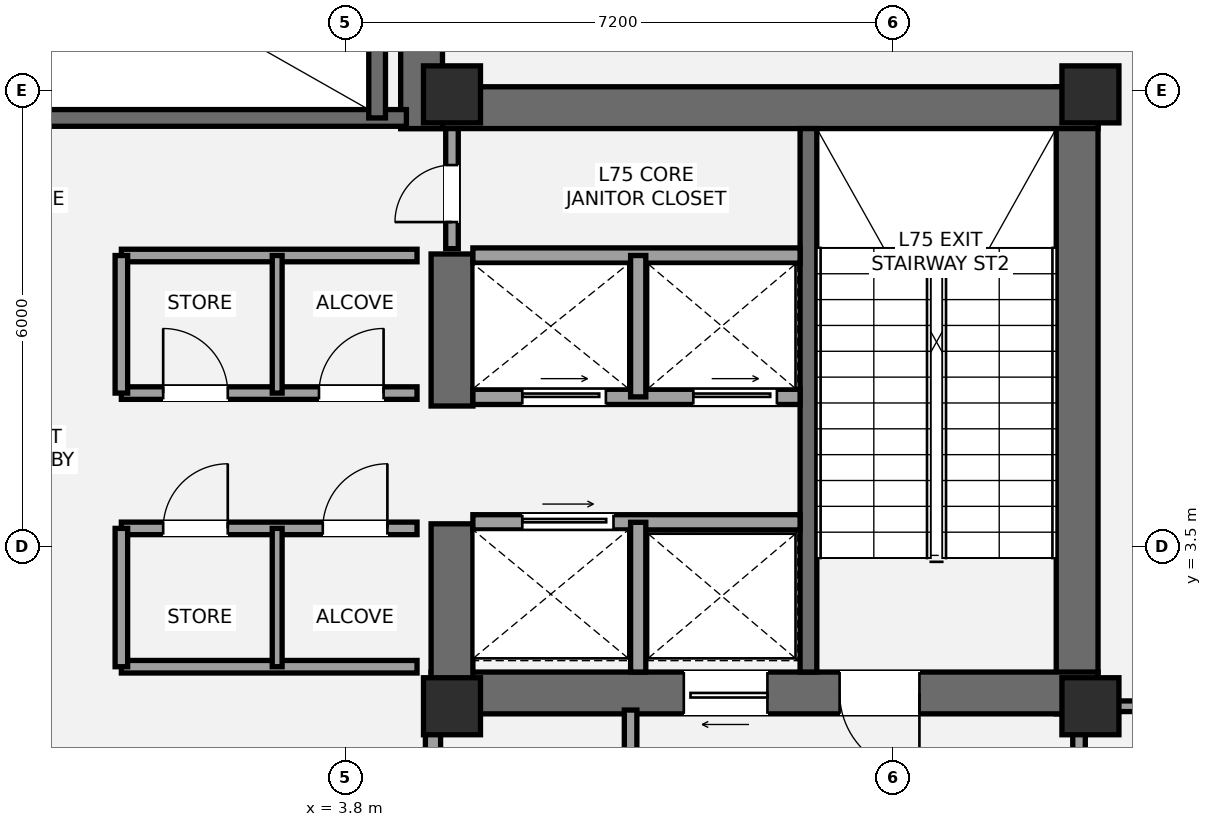
"""IFC4 building model, lengths in metres.
Left out: names, types, materials, properties, quantities, classifications, styles, units other than length and angle.
Written with IfcOpenShell. Run it as: python <this file> out.ifc"""

import sys

from ifc_helpers import new_model, si_unit, direction, frame, frame_2d, origin, origin_2d, place, context, subcontext, project, spatial, rectangle, extrude, element, fill, save


model = new_model("IFC4")
c1 = context("Model", 3, precision=1e-05, world=origin(), true_north=direction((0.0, 1.0)))
c2 = subcontext(c1, "Body", "Model", "MODEL_VIEW")
j1 = project(units=[si_unit("LENGTHUNIT", "METRE"), si_unit("PLANEANGLEUNIT", "RADIAN")], contexts=[c1])
p1 = place(None, origin())
s1 = spatial("IfcSite", under=j1, at=p1, CompositionType="ELEMENT")
p2 = place(p1, origin())
s2 = spatial("IfcBuilding", under=s1, at=p2, CompositionType="ELEMENT")
p3 = place(p2, frame((0.0, 0.0, 264.8)))
s3 = spatial("IfcBuildingStorey", under=s2, at=p3, CompositionType="ELEMENT", Elevation=264.8)
p4 = place(p3, frame((13.425, 1.3, 0.0), z_axis=(0.0, 0.0, 1.0), x_axis=(0.0, 1.0, 0.0)))
e1 = element("IfcWall", 1, at=p4, inside=s3, PredefinedType="SHEAR", context=c2, shape_type="SweptSolid", body=[
    extrude(rectangle(XDim=8.25, YDim=0.55, at=frame_2d((4.125, 0.0))), origin(), (0.0, 0.0, 1.0), 4.4),
])
p5 = place(p3, frame((4.525, 9.275, 0.0), z_axis=(0.0, 0.0, 1.0), x_axis=(1.0, 0.0, 0.0)))
e2 = element("IfcWall", 2, at=p5, inside=s3, PredefinedType="SHEAR", context=c2, shape_type="SweptSolid", body=[
    extrude(rectangle(XDim=9.175, YDim=0.55, at=frame_2d((4.587, 0.0))), origin(), (0.0, 0.0, 1.0), 4.4),
])
p6 = place(p3, frame((13.7, 1.575, 0.0), z_axis=(0.0, 0.0, 1.0), x_axis=(-1.0, 0.0, 0.0)))
e3 = element("IfcWall", 3, at=p6, inside=s3, PredefinedType="SHEAR", context=c2, shape_type="SweptSolid", body=[
    extrude(rectangle(XDim=8.775, YDim=0.55, at=frame_2d((4.387, 0.0))), origin(), (0.0, 0.0, 1.0), 4.4),
])
p7 = place(p6, frame((2.35, 0.0, 0.0)))
e4 = element("IfcOpeningElement", 4, at=p7, cuts=e3, PredefinedType="OPENING", context=c2, shape_type="SweptSolid", body=[
    extrude(rectangle(XDim=1.05, YDim=2.15, at=frame_2d((0.525, 1.075))), frame((0.0, 0.285, 0.0), z_axis=(0.0, -1.0, 0.0), x_axis=(1.0, 0.0, 0.0)), (0.0, 0.0, 1.0), 0.57),
])
p8 = place(p6, frame((4.35, 0.0, 0.0)))
e5 = element("IfcOpeningElement", 5, at=p8, cuts=e3, PredefinedType="OPENING", context=c2, shape_type="SweptSolid", body=[
    extrude(rectangle(XDim=1.1, YDim=2.2, at=frame_2d((0.55, 1.1))), frame((0.0, 0.285, 0.0), z_axis=(0.0, -1.0, 0.0), x_axis=(1.0, 0.0, 0.0)), (0.0, 0.0, 1.0), 0.57),
])
p9 = place(p3, frame((5.2, 1.3, 0.0), z_axis=(0.0, 0.0, 1.0), x_axis=(0.0, 1.0, 0.0)))
e6 = element("IfcWall", 6, at=p9, inside=s3, PredefinedType="SHEAR", context=c2, shape_type="SweptSolid", body=[
    extrude(rectangle(XDim=2.5, YDim=0.55, at=frame_2d((1.25, 0.0))), origin(), (0.0, 0.0, 1.0), 4.4),
])
p10 = place(p3, frame((5.2, 5.35, 0.0), z_axis=(0.0, 0.0, 1.0), x_axis=(0.0, 1.0, 0.0)))
e7 = element("IfcWall", 7, at=p10, inside=s3, PredefinedType="SHEAR", context=c2, shape_type="SweptSolid", body=[
    extrude(rectangle(XDim=2.0, YDim=0.55, at=frame_2d((1.0, 0.0))), origin(), (0.0, 0.0, 1.0), 4.4),
])
p11 = place(p3, frame((9.89, 1.85, 0.0), z_axis=(0.0, 0.0, 1.0), x_axis=(0.0, 1.0, 0.0)))
e8 = element("IfcWall", 8, at=p11, inside=s3, PredefinedType="SHEAR", context=c2, shape_type="SweptSolid", body=[
    extrude(rectangle(XDim=7.15, YDim=0.22, at=frame_2d((3.575, 0.0))), origin(), (0.0, 0.0, 1.0), 4.4),
])
p12 = place(p3, frame((4.8, 9.0, 0.0), z_axis=(0.0, 0.0, 1.0), x_axis=(0.0, 1.0, 0.0)))
e9 = element("IfcWall", 9, at=p12, inside=s3, PredefinedType="SHEAR", context=c2, shape_type="SweptSolid", body=[
    extrude(rectangle(XDim=3.95, YDim=0.55, at=frame_2d((1.975, 0.0))), origin(), (0.0, 0.0, 1.0), 4.4),
])
p13 = place(p3, frame((-4.7, 9.14, 0.0), z_axis=(0.0, 0.0, 1.0), x_axis=(1.0, 0.0, 0.0)))
e10 = element("IfcWall", 10, at=p13, inside=s3, PredefinedType="SHEAR", context=c2, shape_type="SweptSolid", body=[
    extrude(rectangle(XDim=9.3, YDim=0.22, at=frame_2d((4.65, 0.0))), origin(), (0.0, 0.0, 1.0), 4.4),
])
p14 = place(p13, frame((1.15, 0.0, 0.0)))
e11 = element("IfcOpeningElement", 11, at=p14, cuts=e10, PredefinedType="OPENING", context=c2, shape_type="SweptSolid", body=[
    extrude(rectangle(XDim=1.05, YDim=2.15, at=frame_2d((0.525, 1.075))), frame((0.0, 0.12, 0.0), z_axis=(0.0, -1.0, 0.0), x_axis=(1.0, 0.0, 0.0)), (0.0, 0.0, 1.0), 0.24),
])
p15 = place(p3, frame((4.215, 9.14, 0.0), z_axis=(0.0, 0.0, 1.0), x_axis=(0.0, 1.0, 0.0)))
e12 = element("IfcWall", 12, at=p15, inside=s3, PredefinedType="SHEAR", context=c2, shape_type="SweptSolid", body=[
    extrude(rectangle(XDim=3.26, YDim=0.22, at=frame_2d((1.63, 0.0))), origin(), (0.0, 0.0, 1.0), 4.4),
])
for number, where, z_axis, x_axis in (
    (13, (5.2, 1.4, 0.0), (0.0, 0.0, 1.0), (1.0, 0.0, 0.0)),
    (14, (5.2, 9.45, 0.0), (0.0, 0.0, 1.0), (1.0, 0.0, 0.0)),
    (15, (13.6, 1.4, 0.0), (0.0, 0.0, 1.0), (1.0, 0.0, 0.0)),
    (16, (13.6, 9.45, 0.0), (0.0, 0.0, 1.0), (1.0, 0.0, 0.0)),
):
    element("IfcColumn", number, at=place(p3, frame(where, z_axis=z_axis, x_axis=x_axis)), inside=s3, PredefinedType="PILASTER", context=c2, shape_type="SweptSolid", body=[
        extrude(rectangle(XDim=0.75, YDim=0.75, at=origin_2d()), origin(), (0.0, 0.0, 1.0), 4.4),
    ])
p16 = place(p3, frame((14.188, 11.64, 0.0), z_axis=(0.0, 0.0, 1.0), x_axis=(0.827740547026, -0.56111102895, 0.0)))
e17 = element("IfcWall", 17, at=p16, inside=s3, PredefinedType="STANDARD", context=c2, shape_type="SweptSolid", body=[
    extrude(rectangle(XDim=3.778, YDim=0.44, at=frame_2d((1.889, 0.0))), origin(), (0.0, 0.0, 1.0), 3.566),
])
p17 = place(p16, frame((0.446, 0.0, 0.6)))
e18 = element("IfcOpeningElement", 18, at=p17, cuts=e17, PredefinedType="OPENING", context=c2, shape_type="SweptSolid", body=[
    extrude(rectangle(XDim=2.0, YDim=2.1, at=frame_2d((1.0, 1.05))), frame((0.0, 0.23, 0.0), z_axis=(0.0, -1.0, 0.0), x_axis=(1.0, 0.0, 0.0)), (0.0, 0.0, 1.0), 0.46),
])
p18 = place(p3, frame((7.55, -1.88, 0.0), z_axis=(0.0, 0.0, 1.0), x_axis=(0.0, 1.0, 0.0)))
e19 = element("IfcWall", 19, at=p18, inside=s3, PredefinedType="PARTITIONING", context=c2, shape_type="SweptSolid", body=[
    extrude(rectangle(XDim=3.23, YDim=0.165, at=frame_2d((1.615, 0.0))), origin(), (0.0, 0.0, 1.0), 4.2),
])
p19 = place(p3, frame((13.45, -1.88, 0.0), z_axis=(0.0, 0.0, 1.0), x_axis=(0.0, 1.0, 0.0)))
e20 = element("IfcWall", 20, at=p19, inside=s3, PredefinedType="PARTITIONING", context=c2, shape_type="SweptSolid", body=[
    extrude(rectangle(XDim=3.23, YDim=0.165, at=frame_2d((1.615, 0.0))), origin(), (0.0, 0.0, 1.0), 3.661),
])
p20 = place(p19, frame((0.95, 0.0, 0.0)))
e21 = element("IfcOpeningElement", 21, at=p20, cuts=e20, PredefinedType="OPENING", context=c2, shape_type="SweptSolid", body=[
    extrude(rectangle(XDim=1.05, YDim=2.15, at=frame_2d((0.525, 1.075))), frame((0.0, 0.093, 0.0), z_axis=(0.0, -1.0, 0.0), x_axis=(1.0, 0.0, 0.0)), (0.0, 0.0, 1.0), 0.185),
])
p21 = place(p3, frame((4.95, -1.88, 0.0), z_axis=(0.0, 0.0, 1.0), x_axis=(0.0, 1.0, 0.0)))
e22 = element("IfcWall", 22, at=p21, inside=s3, PredefinedType="SOLIDWALL", context=c2, shape_type="SweptSolid", body=[
    extrude(rectangle(XDim=3.23, YDim=0.2, at=frame_2d((1.615, 0.0))), origin(), (0.0, 0.0, 1.0), 3.568),
])
p22 = place(p21, frame((0.61, 0.0, 0.0)))
e23 = element("IfcOpeningElement", 23, at=p22, cuts=e22, PredefinedType="OPENING", context=c2, shape_type="SweptSolid", body=[
    extrude(rectangle(XDim=0.75, YDim=2.1, at=frame_2d((0.375, 1.05))), frame((0.0, 0.11, 0.0), z_axis=(0.0, -1.0, 0.0), x_axis=(1.0, 0.0, 0.0)), (0.0, 0.0, 1.0), 0.22),
])
p23 = place(p3, frame((5.475, 3.82, 0.0), z_axis=(0.0, 0.0, 1.0), x_axis=(1.0, 0.0, 0.0)))
e24 = element("IfcWall", 24, at=p23, inside=s3, PredefinedType="SOLIDWALL", context=c2, shape_type="SweptSolid", body=[
    extrude(rectangle(XDim=4.305, YDim=0.2, at=frame_2d((2.152, 0.0))), origin(), (0.0, 0.0, 1.0), 4.2),
])
p24 = place(p23, frame((0.65, 0.0, 0.0)))
e25 = element("IfcOpeningElement", 25, at=p24, cuts=e24, PredefinedType="OPENING", context=c2, shape_type="SweptSolid", body=[
    extrude(rectangle(XDim=1.2, YDim=2.2, at=frame_2d((0.6, 1.1))), frame((0.0, 0.11, 0.0), z_axis=(0.0, -1.0, 0.0), x_axis=(1.0, 0.0, 0.0)), (0.0, 0.0, 1.0), 0.22),
])
p25 = place(p3, frame((7.65, 1.85, 0.0), z_axis=(0.0, 0.0, 1.0), x_axis=(0.0, 1.0, 0.0)))
e26 = element("IfcWall", 26, at=p25, inside=s3, PredefinedType="SOLIDWALL", context=c2, shape_type="SweptSolid", body=[
    extrude(rectangle(XDim=1.97, YDim=0.2, at=frame_2d((0.985, 0.0))), origin(), (0.0, 0.0, 1.0), 4.2),
])
p26 = place(p3, frame((5.475, 5.47, 0.0), z_axis=(0.0, 0.0, 1.0), x_axis=(1.0, 0.0, 0.0)))
e27 = element("IfcWall", 27, at=p26, inside=s3, PredefinedType="SOLIDWALL", context=c2, shape_type="SweptSolid", body=[
    extrude(rectangle(XDim=4.305, YDim=0.2, at=frame_2d((2.152, 0.0))), origin(), (0.0, 0.0, 1.0), 4.2),
])
p27 = place(p26, frame((0.65, 0.0, 0.0)))
e28 = element("IfcOpeningElement", 28, at=p27, cuts=e27, PredefinedType="OPENING", context=c2, shape_type="SweptSolid", body=[
    extrude(rectangle(XDim=1.1, YDim=2.2, at=frame_2d((0.55, 1.1))), frame((0.0, 0.11, 0.0), z_axis=(0.0, -1.0, 0.0), x_axis=(1.0, 0.0, 0.0)), (0.0, 0.0, 1.0), 0.22),
])
p28 = place(p26, frame((2.9, 0.0, 0.0)))
e29 = element("IfcOpeningElement", 29, at=p28, cuts=e27, PredefinedType="OPENING", context=c2, shape_type="SweptSolid", body=[
    extrude(rectangle(XDim=1.1, YDim=2.2, at=frame_2d((0.55, 1.1))), frame((0.0, 0.11, 0.0), z_axis=(0.0, -1.0, 0.0), x_axis=(1.0, 0.0, 0.0)), (0.0, 0.0, 1.0), 0.22),
])
p29 = place(p3, frame((5.475, 7.33, 0.0), z_axis=(0.0, 0.0, 1.0), x_axis=(1.0, 0.0, 0.0)))
e30 = element("IfcWall", 30, at=p29, inside=s3, PredefinedType="SOLIDWALL", context=c2, shape_type="SweptSolid", body=[
    extrude(rectangle(XDim=4.305, YDim=0.2, at=frame_2d((2.152, 0.0))), origin(), (0.0, 0.0, 1.0), 4.2),
])
p30 = place(p3, frame((7.65, 5.47, 0.0), z_axis=(0.0, 0.0, 1.0), x_axis=(0.0, 1.0, 0.0)))
e31 = element("IfcWall", 31, at=p30, inside=s3, PredefinedType="SOLIDWALL", context=c2, shape_type="SweptSolid", body=[
    extrude(rectangle(XDim=1.86, YDim=0.2, at=frame_2d((0.93, 0.0))), origin(), (0.0, 0.0, 1.0), 4.2),
])
p31 = place(p3, frame((0.85, 1.92, 0.0), z_axis=(0.0, 0.0, 1.0), x_axis=(1.0, 0.0, 0.0)))
e32 = element("IfcWall", 32, at=p31, inside=s3, PredefinedType="PARTITIONING", context=c2, shape_type="SweptSolid", body=[
    extrude(rectangle(XDim=3.89, YDim=0.165, at=frame_2d((1.945, 0.0))), origin(), (0.0, 0.0, 1.0), 3.34),
])
p32 = place(p3, frame((0.85, 3.74, 0.0), z_axis=(0.0, 0.0, 1.0), x_axis=(1.0, 0.0, 0.0)))
e33 = element("IfcWall", 33, at=p32, inside=s3, PredefinedType="PARTITIONING", context=c2, shape_type="SweptSolid", body=[
    extrude(rectangle(XDim=3.89, YDim=0.165, at=frame_2d((1.945, 0.0))), origin(), (0.0, 0.0, 1.0), 4.2),
])
p33 = place(p32, frame((0.55, 0.0, 0.0)))
e34 = element("IfcOpeningElement", 34, at=p33, cuts=e33, PredefinedType="OPENING", context=c2, shape_type="SweptSolid", body=[
    extrude(rectangle(XDim=0.85, YDim=2.1, at=frame_2d((0.425, 1.05))), frame((0.0, 0.093, 0.0), z_axis=(0.0, -1.0, 0.0), x_axis=(1.0, 0.0, 0.0)), (0.0, 0.0, 1.0), 0.185),
])
p34 = place(p32, frame((2.65, 0.0, 0.0)))
e35 = element("IfcOpeningElement", 35, at=p34, cuts=e33, PredefinedType="OPENING", context=c2, shape_type="SweptSolid", body=[
    extrude(rectangle(XDim=0.85, YDim=2.1, at=frame_2d((0.425, 1.05))), frame((0.0, 0.093, 0.0), z_axis=(0.0, -1.0, 0.0), x_axis=(1.0, 0.0, 0.0)), (0.0, 0.0, 1.0), 0.185),
])
p35 = place(p3, frame((0.85, 1.92, 0.0), z_axis=(0.0, 0.0, 1.0), x_axis=(0.0, 1.0, 0.0)))
e36 = element("IfcWall", 36, at=p35, inside=s3, PredefinedType="PARTITIONING", context=c2, shape_type="SweptSolid", body=[
    extrude(rectangle(XDim=1.82, YDim=0.165, at=frame_2d((0.91, 0.0))), origin(), (0.0, 0.0, 1.0), 4.2),
])
p36 = place(p3, frame((2.9, 1.92, 0.0), z_axis=(0.0, 0.0, 1.0), x_axis=(0.0, 1.0, 0.0)))
e37 = element("IfcWall", 37, at=p36, inside=s3, PredefinedType="PARTITIONING", context=c2, shape_type="SweptSolid", body=[
    extrude(rectangle(XDim=1.82, YDim=0.13, at=frame_2d((0.91, 0.0))), origin(), (0.0, 0.0, 1.0), 4.2),
])
p37 = place(p3, frame((0.85, 5.52, 0.0), z_axis=(0.0, 0.0, 1.0), x_axis=(1.0, 0.0, 0.0)))
e38 = element("IfcWall", 38, at=p37, inside=s3, PredefinedType="PARTITIONING", context=c2, shape_type="SweptSolid", body=[
    extrude(rectangle(XDim=3.89, YDim=0.165, at=frame_2d((1.945, 0.0))), origin(), (0.0, 0.0, 1.0), 4.2),
])
p38 = place(p37, frame((0.55, 0.0, 0.0)))
e39 = element("IfcOpeningElement", 39, at=p38, cuts=e38, PredefinedType="OPENING", context=c2, shape_type="SweptSolid", body=[
    extrude(rectangle(XDim=0.85, YDim=2.1, at=frame_2d((0.425, 1.05))), frame((0.0, 0.093, 0.0), z_axis=(0.0, -1.0, 0.0), x_axis=(1.0, 0.0, 0.0)), (0.0, 0.0, 1.0), 0.185),
])
p39 = place(p37, frame((2.6, 0.0, 0.0)))
e40 = element("IfcOpeningElement", 40, at=p39, cuts=e38, PredefinedType="OPENING", context=c2, shape_type="SweptSolid", body=[
    extrude(rectangle(XDim=0.85, YDim=2.1, at=frame_2d((0.425, 1.05))), frame((0.0, 0.093, 0.0), z_axis=(0.0, -1.0, 0.0), x_axis=(1.0, 0.0, 0.0)), (0.0, 0.0, 1.0), 0.185),
])
p40 = place(p3, frame((0.85, 7.33, 0.0), z_axis=(0.0, 0.0, 1.0), x_axis=(1.0, 0.0, 0.0)))
e41 = element("IfcWall", 41, at=p40, inside=s3, PredefinedType="PARTITIONING", context=c2, shape_type="SweptSolid", body=[
    extrude(rectangle(XDim=3.89, YDim=0.165, at=frame_2d((1.945, 0.0))), origin(), (0.0, 0.0, 1.0), 4.2),
])
p41 = place(p3, frame((0.85, 5.52, 0.0), z_axis=(0.0, 0.0, 1.0), x_axis=(0.0, 1.0, 0.0)))
e42 = element("IfcWall", 42, at=p41, inside=s3, PredefinedType="PARTITIONING", context=c2, shape_type="SweptSolid", body=[
    extrude(rectangle(XDim=1.81, YDim=0.165, at=frame_2d((0.905, 0.0))), origin(), (0.0, 0.0, 1.0), 4.2),
])
p42 = place(p3, frame((2.9, 5.52, 0.0), z_axis=(0.0, 0.0, 1.0), x_axis=(0.0, 1.0, 0.0)))
e43 = element("IfcWall", 43, at=p42, inside=s3, PredefinedType="PARTITIONING", context=c2, shape_type="SweptSolid", body=[
    extrude(rectangle(XDim=1.81, YDim=0.13, at=frame_2d((0.905, 0.0))), origin(), (0.0, 0.0, 1.0), 4.2),
])
p43 = place(p3, frame((5.2, 7.42, 0.0), z_axis=(0.0, 0.0, 1.0), x_axis=(0.0, 1.0, 0.0)))
e44 = element("IfcWall", 44, at=p43, inside=s3, PredefinedType="PARTITIONING", context=c2, shape_type="SweptSolid", body=[
    extrude(rectangle(XDim=1.58, YDim=0.165, at=frame_2d((0.79, 0.0))), origin(), (0.0, 0.0, 1.0), 4.2),
])
p44 = place(p43, frame((0.35, 0.0, 0.0)))
e45 = element("IfcOpeningElement", 45, at=p44, cuts=e44, PredefinedType="OPENING", context=c2, shape_type="SweptSolid", body=[
    extrude(rectangle(XDim=0.75, YDim=2.1, at=frame_2d((0.375, 1.05))), frame((0.0, 0.093, 0.0), z_axis=(0.0, -1.0, 0.0), x_axis=(1.0, 0.0, 0.0)), (0.0, 0.0, 1.0), 0.185),
])
p45 = place(p3, frame((13.7, 1.4, 0.0), z_axis=(0.0, 0.0, 1.0), x_axis=(1.0, 0.0, 0.0)))
e46 = element("IfcWall", 46, at=p45, inside=s3, PredefinedType="PARTITIONING", context=c2, shape_type="SweptSolid", body=[
    extrude(rectangle(XDim=1.75, YDim=0.14, at=frame_2d((0.875, 0.0))), origin(), (0.0, 0.0, 1.0), 3.661),
])
p46 = place(p45, frame((0.56, 0.0, 0.0)))
e47 = element("IfcOpeningElement", 47, at=p46, cuts=e46, PredefinedType="OPENING", context=c2, shape_type="SweptSolid", body=[
    extrude(rectangle(XDim=0.92, YDim=2.15, at=frame_2d((0.46, 1.075))), frame((0.0, 0.08, 0.0), z_axis=(0.0, -1.0, 0.0), x_axis=(1.0, 0.0, 0.0)), (0.0, 0.0, 1.0), 0.16),
])
p47 = place(p7, origin())
e48 = element("IfcDoor", 48, at=p47, inside=s3, OperationType="SINGLE_SWING_LEFT", PredefinedType="DOOR", context=c2, shape_type="SweptSolid", body=[
    extrude(rectangle(XDim=1.05, YDim=2.15, at=frame_2d((0.525, 1.075))), frame((0.0, 0.025, 0.0), z_axis=(0.0, -1.0, 0.0), x_axis=(1.0, 0.0, 0.0)), (0.0, 0.0, 1.0), 0.05),
])
fill(e4, e48)
p48 = place(p8, origin())
e49 = element("IfcDoor", 49, at=p48, inside=s3, OperationType="SLIDING_TO_LEFT", PredefinedType="DOOR", context=c2, shape_type="SweptSolid", body=[
    extrude(rectangle(XDim=1.1, YDim=2.2, at=frame_2d((0.55, 1.1))), frame((0.0, 0.025, 0.0), z_axis=(0.0, -1.0, 0.0), x_axis=(1.0, 0.0, 0.0)), (0.0, 0.0, 1.0), 0.05),
])
fill(e5, e49)
p49 = place(p24, origin())
e50 = element("IfcDoor", 50, at=p49, inside=s3, OperationType="SLIDING_TO_RIGHT", PredefinedType="DOOR", context=c2, shape_type="SweptSolid", body=[
    extrude(rectangle(XDim=1.2, YDim=2.2, at=frame_2d((0.6, 1.1))), frame((0.0, 0.025, 0.0), z_axis=(0.0, -1.0, 0.0), x_axis=(1.0, 0.0, 0.0)), (0.0, 0.0, 1.0), 0.05),
])
fill(e25, e50)
p50 = place(p27, origin())
e51 = element("IfcDoor", 51, at=p50, inside=s3, OperationType="SLIDING_TO_LEFT", PredefinedType="DOOR", context=c2, shape_type="SweptSolid", body=[
    extrude(rectangle(XDim=1.1, YDim=2.2, at=frame_2d((0.55, 1.1))), frame((0.0, 0.025, 0.0), z_axis=(0.0, -1.0, 0.0), x_axis=(1.0, 0.0, 0.0)), (0.0, 0.0, 1.0), 0.05),
])
fill(e28, e51)
p51 = place(p28, origin())
e52 = element("IfcDoor", 52, at=p51, inside=s3, OperationType="SLIDING_TO_LEFT", PredefinedType="DOOR", context=c2, shape_type="SweptSolid", body=[
    extrude(rectangle(XDim=1.1, YDim=2.2, at=frame_2d((0.55, 1.1))), frame((0.0, 0.025, 0.0), z_axis=(0.0, -1.0, 0.0), x_axis=(1.0, 0.0, 0.0)), (0.0, 0.0, 1.0), 0.05),
])
fill(e29, e52)
p52 = place(p33, origin())
e53 = element("IfcDoor", 53, at=p52, inside=s3, OperationType="SINGLE_SWING_RIGHT", PredefinedType="DOOR", context=c2, shape_type="SweptSolid", body=[
    extrude(rectangle(XDim=0.85, YDim=2.1, at=frame_2d((0.425, 1.05))), frame((0.0, 0.025, 0.0), z_axis=(0.0, -1.0, 0.0), x_axis=(1.0, 0.0, 0.0)), (0.0, 0.0, 1.0), 0.05),
])
fill(e34, e53)
p53 = place(p34, origin())
e54 = element("IfcDoor", 54, at=p53, inside=s3, OperationType="SINGLE_SWING_RIGHT", PredefinedType="DOOR", context=c2, shape_type="SweptSolid", body=[
    extrude(rectangle(XDim=0.85, YDim=2.1, at=frame_2d((0.425, 1.05))), frame((0.0, 0.025, 0.0), z_axis=(0.0, -1.0, 0.0), x_axis=(1.0, 0.0, 0.0)), (0.0, 0.0, 1.0), 0.05),
])
fill(e35, e54)
p54 = place(p38, origin())
e55 = element("IfcDoor", 55, at=p54, inside=s3, OperationType="SINGLE_SWING_LEFT", PredefinedType="DOOR", context=c2, shape_type="SweptSolid", body=[
    extrude(rectangle(XDim=0.85, YDim=2.1, at=frame_2d((0.425, 1.05))), frame((0.0, 0.025, 0.0), z_axis=(0.0, -1.0, 0.0), x_axis=(1.0, 0.0, 0.0)), (0.0, 0.0, 1.0), 0.05),
])
fill(e39, e55)
p55 = place(p39, origin())
e56 = element("IfcDoor", 56, at=p55, inside=s3, OperationType="SINGLE_SWING_RIGHT", PredefinedType="DOOR", context=c2, shape_type="SweptSolid", body=[
    extrude(rectangle(XDim=0.85, YDim=2.1, at=frame_2d((0.425, 1.05))), frame((0.0, 0.025, 0.0), z_axis=(0.0, -1.0, 0.0), x_axis=(1.0, 0.0, 0.0)), (0.0, 0.0, 1.0), 0.05),
])
fill(e40, e56)
p56 = place(p44, origin())
e57 = element("IfcDoor", 57, at=p56, inside=s3, OperationType="SINGLE_SWING_LEFT", PredefinedType="DOOR", context=c2, shape_type="SweptSolid", body=[
    extrude(rectangle(XDim=0.75, YDim=2.1, at=frame_2d((0.375, 1.05))), frame((0.0, 0.025, 0.0), z_axis=(0.0, -1.0, 0.0), x_axis=(1.0, 0.0, 0.0)), (0.0, 0.0, 1.0), 0.05),
])
fill(e45, e57)
save(model, sys.argv[1])
